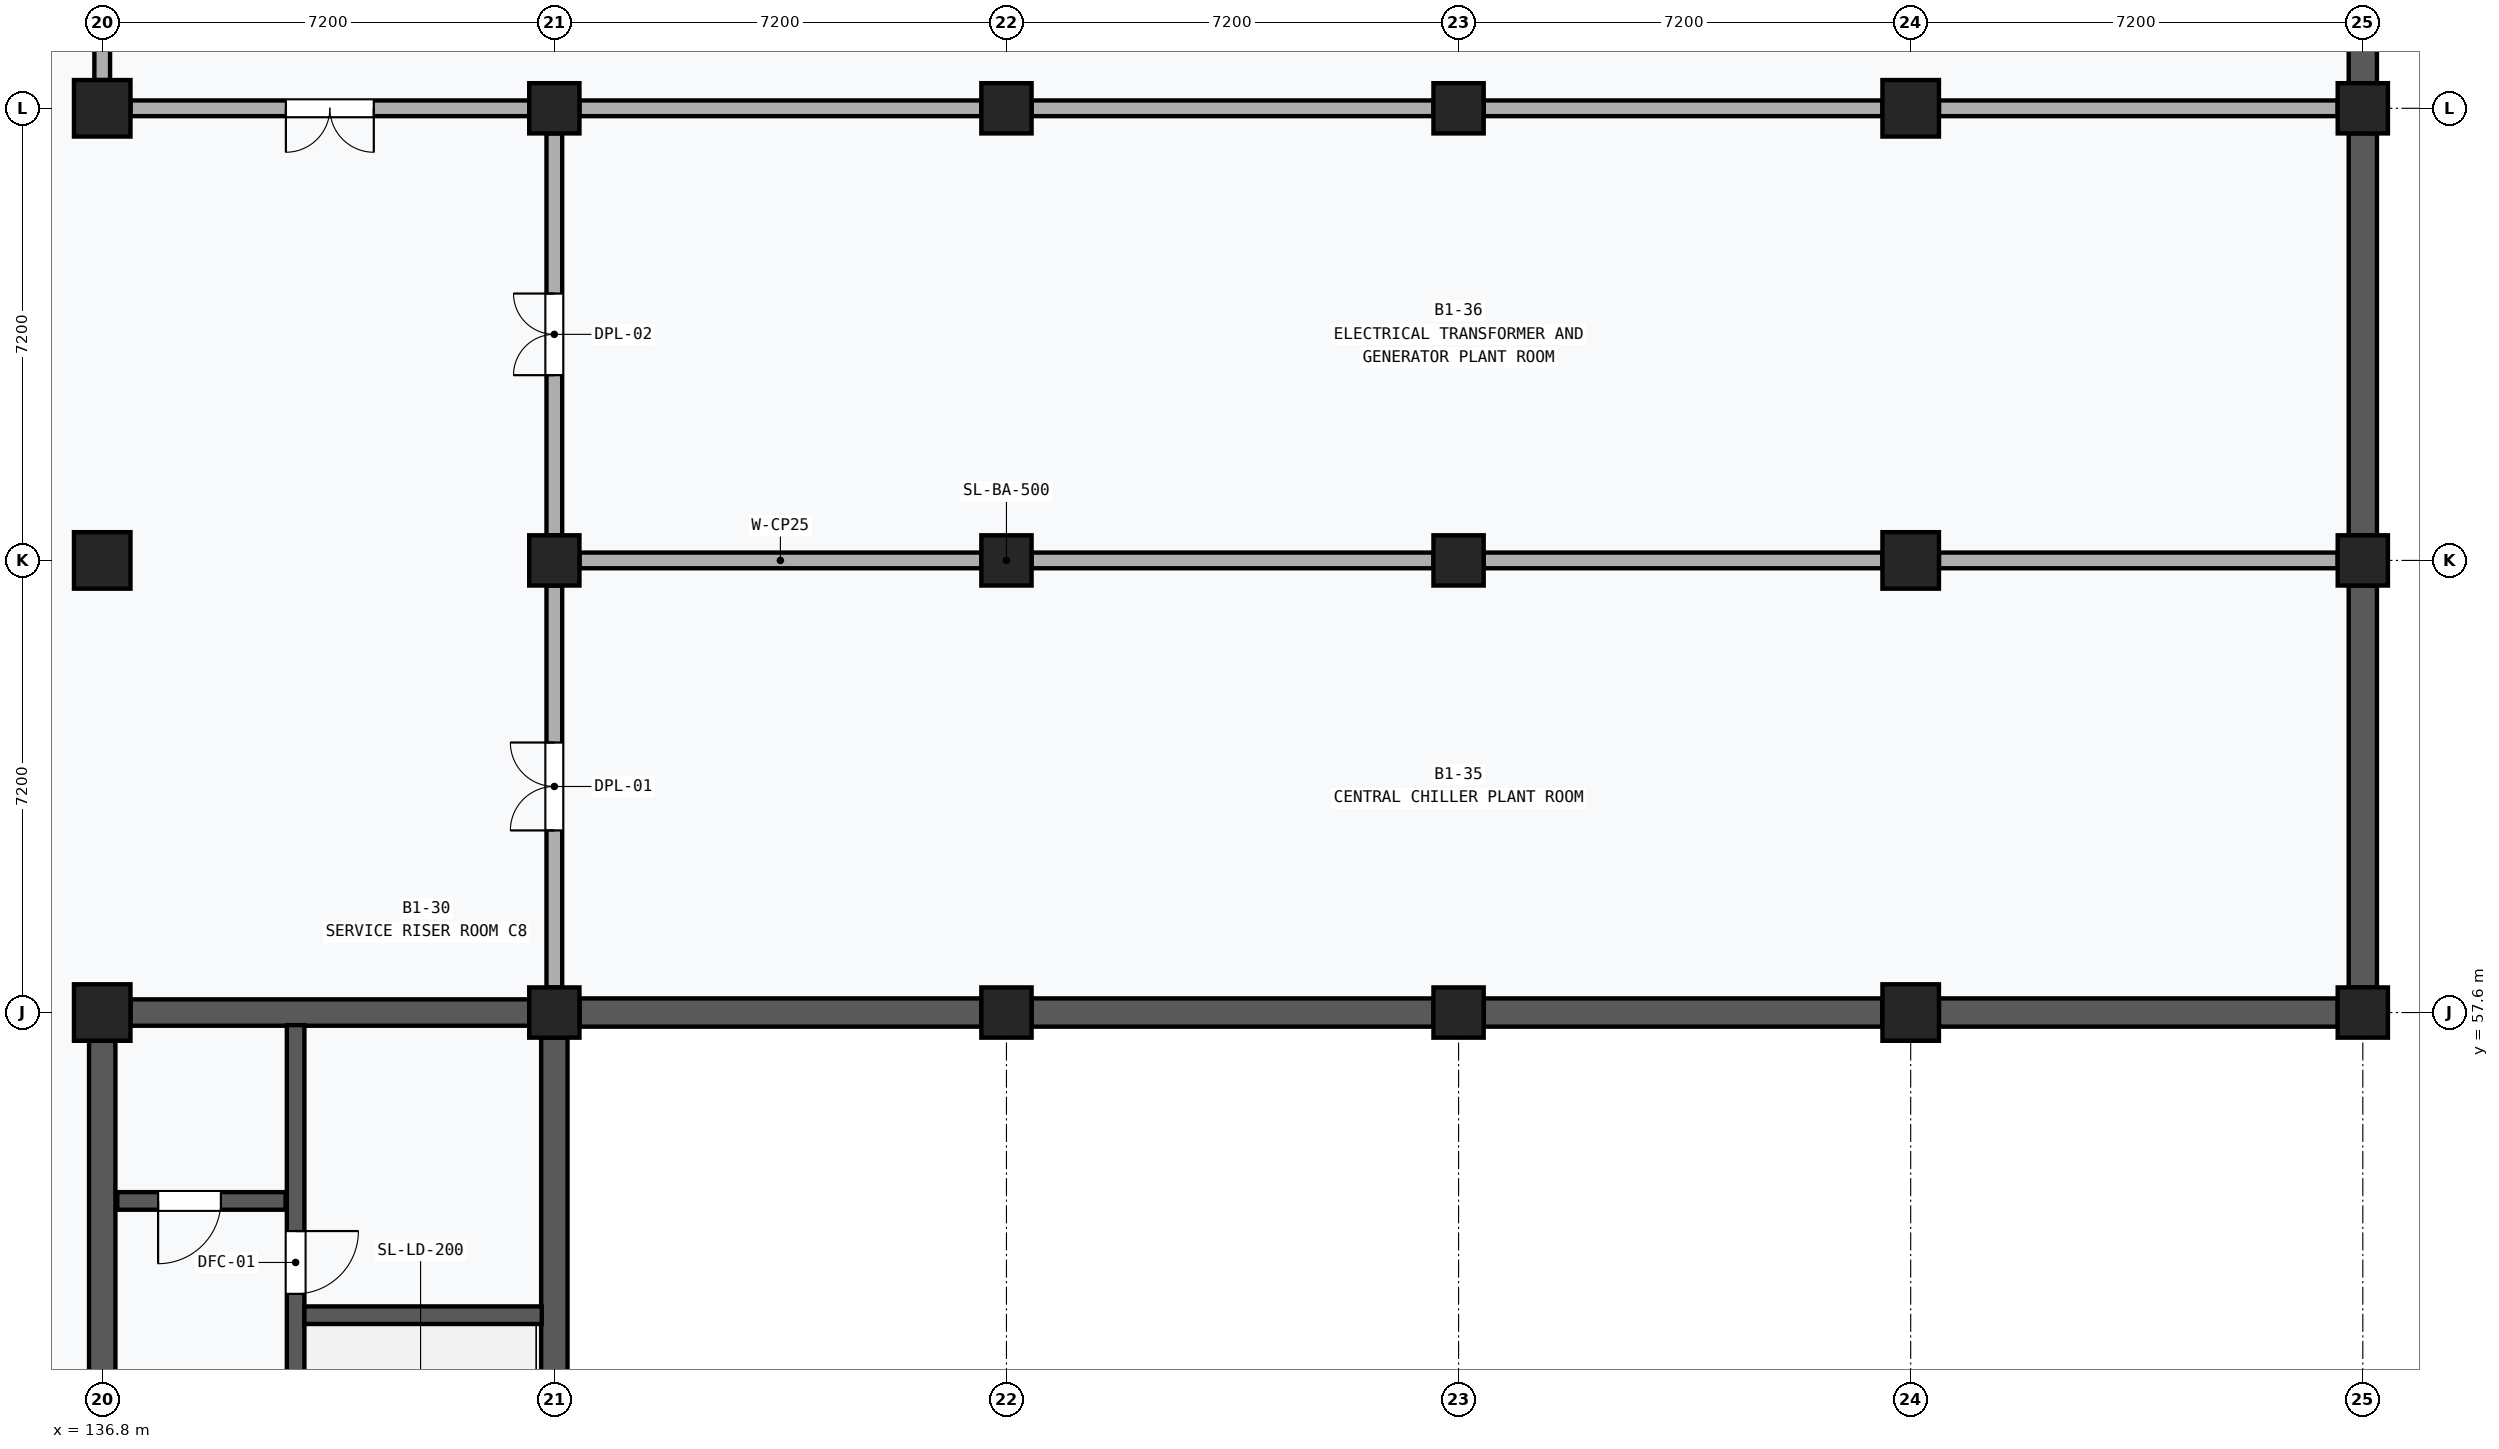
"""IFC4 building model, lengths in metres.
Left out: names, types, materials, properties, quantities, classifications, styles, units other than length and angle.
Written with IfcOpenShell. Run it as: python <this file> out.ifc"""

import sys

from ifc_helpers import new_model, si_unit, direction, frame, frame_2d, origin, origin_2d, place, context, subcontext, project, spatial, rectangle, extrude, element, fill, save


model = new_model("IFC4")
c1 = context("Model", 3, precision=1e-05, world=origin(), true_north=direction((0.0, 1.0)))
c2 = subcontext(c1, "Body", "Model", "MODEL_VIEW")
j1 = project(units=[si_unit("LENGTHUNIT", "METRE"), si_unit("PLANEANGLEUNIT", "RADIAN")], contexts=[c1])
p1 = place(None, origin())
s1 = spatial("IfcSite", under=j1, at=p1, CompositionType="ELEMENT")
p2 = place(p1, origin())
s2 = spatial("IfcBuilding", under=s1, at=p2, CompositionType="ELEMENT")
p3 = place(p2, frame((0.0, 0.0, -4.5)))
s3 = spatial("IfcBuildingStorey", under=s2, at=p3, CompositionType="ELEMENT", Elevation=-4.5)
for number, where, z_axis, x_axis in (
    (1, (136.8, 57.6, 0.0), (0.0, 0.0, 1.0), (1.0, 0.0, 0.0)),
    (2, (136.8, 64.8, 0.0), (0.0, 0.0, 1.0), (1.0, 0.0, 0.0)),
    (3, (136.8, 72.0, 0.0), (0.0, 0.0, 1.0), (1.0, 0.0, 0.0)),
):
    element("IfcColumn", number, at=place(p3, frame(where, z_axis=z_axis, x_axis=x_axis)), inside=s3, PredefinedType="COLUMN", context=c2, shape_type="SweptSolid", body=[
        extrude(rectangle(XDim=0.9, YDim=0.9, at=origin_2d()), origin(), (0.0, 0.0, 1.0), 4.5),
    ])
for number, where, z_axis, x_axis in (
    (4, (144.0, 57.6, 0.0), (0.0, 0.0, 1.0), (1.0, 0.0, 0.0)),
    (5, (144.0, 64.8, 0.0), (0.0, 0.0, 1.0), (1.0, 0.0, 0.0)),
    (6, (144.0, 72.0, 0.0), (0.0, 0.0, 1.0), (1.0, 0.0, 0.0)),
    (7, (151.2, 57.6, 0.0), (0.0, 0.0, 1.0), (1.0, 0.0, 0.0)),
    (8, (151.2, 64.8, 0.0), (0.0, 0.0, 1.0), (1.0, 0.0, 0.0)),
    (9, (151.2, 72.0, 0.0), (0.0, 0.0, 1.0), (1.0, 0.0, 0.0)),
    (10, (158.4, 57.6, 0.0), (0.0, 0.0, 1.0), (1.0, 0.0, 0.0)),
    (11, (158.4, 64.8, 0.0), (0.0, 0.0, 1.0), (1.0, 0.0, 0.0)),
    (12, (158.4, 72.0, 0.0), (0.0, 0.0, 1.0), (1.0, 0.0, 0.0)),
):
    element("IfcColumn", number, at=place(p3, frame(where, z_axis=z_axis, x_axis=x_axis)), inside=s3, PredefinedType="COLUMN", context=c2, shape_type="SweptSolid", body=[
        extrude(rectangle(XDim=0.8, YDim=0.8, at=origin_2d()), origin(), (0.0, 0.0, 1.0), 4.5),
    ])
for number, where, z_axis, x_axis in (
    (13, (165.6, 57.6, 0.0), (0.0, 0.0, 1.0), (1.0, 0.0, 0.0)),
    (14, (165.6, 64.8, 0.0), (0.0, 0.0, 1.0), (1.0, 0.0, 0.0)),
    (15, (165.6, 72.0, 0.0), (0.0, 0.0, 1.0), (1.0, 0.0, 0.0)),
):
    element("IfcColumn", number, at=place(p3, frame(where, z_axis=z_axis, x_axis=x_axis)), inside=s3, PredefinedType="COLUMN", context=c2, shape_type="SweptSolid", body=[
        extrude(rectangle(XDim=0.9, YDim=0.9, at=origin_2d()), origin(), (0.0, 0.0, 1.0), 4.5),
    ])
for number, where, z_axis, x_axis in (
    (16, (172.8, 57.6, 0.0), (0.0, 0.0, 1.0), (1.0, 0.0, 0.0)),
    (17, (172.8, 64.8, 0.0), (0.0, 0.0, 1.0), (1.0, 0.0, 0.0)),
    (18, (172.8, 72.0, 0.0), (0.0, 0.0, 1.0), (1.0, 0.0, 0.0)),
):
    element("IfcColumn", number, at=place(p3, frame(where, z_axis=z_axis, x_axis=x_axis)), inside=s3, PredefinedType="COLUMN", context=c2, shape_type="SweptSolid", body=[
        extrude(rectangle(XDim=0.8, YDim=0.8, at=origin_2d()), origin(), (0.0, 0.0, 1.0), 4.5),
    ])
p4 = place(p3, frame((144.4, 57.6, 0.0), z_axis=(0.0, 0.0, 1.0), x_axis=(1.0, 0.0, 0.0)))
e19 = element("IfcWall", 19, at=p4, inside=s3, PredefinedType="SOLIDWALL", context=c2, shape_type="SweptSolid", body=[
    extrude(rectangle(XDim=6.4, YDim=0.45, at=frame_2d((3.2, 0.0))), origin(), (0.0, 0.0, 1.0), 3.57),
])
p5 = place(p3, frame((151.6, 57.6, 0.0), z_axis=(0.0, 0.0, 1.0), x_axis=(1.0, 0.0, 0.0)))
e20 = element("IfcWall", 20, at=p5, inside=s3, PredefinedType="SOLIDWALL", context=c2, shape_type="SweptSolid", body=[
    extrude(rectangle(XDim=6.4, YDim=0.45, at=frame_2d((3.2, 0.0))), origin(), (0.0, 0.0, 1.0), 3.57),
])
for number, where, z_axis, x_axis in (
    (21, (158.8, 57.6, 0.0), (0.0, 0.0, 1.0), (1.0, 0.0, 0.0)),
    (22, (166.05, 57.6, 0.0), (0.0, 0.0, 1.0), (1.0, 0.0, 0.0)),
):
    element("IfcWall", number, at=place(p3, frame(where, z_axis=z_axis, x_axis=x_axis)), inside=s3, PredefinedType="SOLIDWALL", context=c2, shape_type="SweptSolid", body=[
        extrude(rectangle(XDim=6.35, YDim=0.45, at=frame_2d((3.175, 0.0))), origin(), (0.0, 0.0, 1.0), 3.57),
    ])
p6 = place(p3, frame((172.8, 58.0, 0.0), z_axis=(0.0, 0.0, 1.0), x_axis=(0.0, 1.0, 0.0)))
e23 = element("IfcWall", 23, at=p6, inside=s3, PredefinedType="SOLIDWALL", context=c2, shape_type="SweptSolid", body=[
    extrude(rectangle(XDim=6.4, YDim=0.45, at=frame_2d((3.2, 0.0))), origin(), (0.0, 0.0, 1.0), 3.57),
])
for number, where, z_axis, x_axis in (
    (24, (172.8, 65.2, 0.0), (0.0, 0.0, 1.0), (0.0, 1.0, 0.0)),
    (25, (172.8, 72.4, 0.0), (0.0, 0.0, 1.0), (0.0, 1.0, 0.0)),
):
    element("IfcWall", number, at=place(p3, frame(where, z_axis=z_axis, x_axis=x_axis)), inside=s3, PredefinedType="SOLIDWALL", context=c2, shape_type="SweptSolid", body=[
        extrude(rectangle(XDim=6.4, YDim=0.45, at=frame_2d((3.2, 0.0))), origin(), (0.0, 0.0, 1.0), 3.57),
    ])
p7 = place(p3, frame((136.8, 50.85, 0.0), z_axis=(0.0, 0.0, 1.0), x_axis=(0.0, 1.0, 0.0)))
e26 = element("IfcWall", 26, at=p7, inside=s3, PredefinedType="SHEAR", context=c2, shape_type="SweptSolid", body=[
    extrude(rectangle(XDim=6.3, YDim=0.42, at=frame_2d((3.15, 0.0))), origin(), (0.0, 0.0, 1.0), 3.3),
])
p8 = place(p3, frame((144.0, 50.8, 0.0), z_axis=(0.0, 0.0, 1.0), x_axis=(0.0, 1.0, 0.0)))
e27 = element("IfcWall", 27, at=p8, inside=s3, PredefinedType="SHEAR", context=c2, shape_type="SweptSolid", body=[
    extrude(rectangle(XDim=6.4, YDim=0.42, at=frame_2d((3.2, 0.0))), origin(), (0.0, 0.0, 1.0), 3.57),
])
p9 = place(p3, frame((137.25, 57.6, 0.0), z_axis=(0.0, 0.0, 1.0), x_axis=(1.0, 0.0, 0.0)))
e28 = element("IfcWall", 28, at=p9, inside=s3, PredefinedType="SHEAR", context=c2, shape_type="SweptSolid", body=[
    extrude(rectangle(XDim=6.35, YDim=0.42, at=frame_2d((3.175, 0.0))), origin(), (0.0, 0.0, 1.0), 3.3),
])
p10 = place(p3, frame((139.88, 43.4, 0.0), z_axis=(0.0, 0.0, 1.0), x_axis=(0.0, 1.0, 0.0)))
e29 = element("IfcWall", 29, at=p10, inside=s3, PredefinedType="SHEAR", context=c2, shape_type="SweptSolid", body=[
    extrude(rectangle(XDim=14.0, YDim=0.28, at=frame_2d((7.0, 0.0))), origin(), (0.0, 0.0, 1.0), 4.2),
])
p11 = place(p10, frame((0.35, 0.0, 0.0)))
e30 = element("IfcOpeningElement", 30, at=p11, cuts=e29, PredefinedType="OPENING", context=c2, shape_type="SweptSolid", body=[
    extrude(rectangle(XDim=1.75, YDim=2.15, at=frame_2d((0.875, 1.075))), frame((0.0, 0.152, 0.0), z_axis=(0.0, -1.0, 0.0), x_axis=(1.0, 0.0, 0.0)), (0.0, 0.0, 1.0), 0.304),
])
p12 = place(p10, frame((9.72, 0.0, 0.0)))
e31 = element("IfcOpeningElement", 31, at=p12, cuts=e29, PredefinedType="OPENING", context=c2, shape_type="SweptSolid", body=[
    extrude(rectangle(XDim=1.0, YDim=2.15, at=frame_2d((0.5, 1.075))), frame((0.0, 0.152, 0.0), z_axis=(0.0, -1.0, 0.0), x_axis=(1.0, 0.0, 0.0)), (0.0, 0.0, 1.0), 0.304),
])
p13 = place(p3, frame((140.02, 52.78, 0.0), z_axis=(0.0, 0.0, 1.0), x_axis=(1.0, 0.0, 0.0)))
e32 = element("IfcWall", 32, at=p13, inside=s3, PredefinedType="SHEAR", context=c2, shape_type="SweptSolid", body=[
    extrude(rectangle(XDim=3.78, YDim=0.28, at=frame_2d((1.89, 0.0))), origin(), (0.0, 0.0, 1.0), 4.2),
])
p14 = place(p3, frame((137.04, 54.6, 0.0), z_axis=(0.0, 0.0, 1.0), x_axis=(1.0, 0.0, 0.0)))
e33 = element("IfcWall", 33, at=p14, inside=s3, PredefinedType="SHEAR", context=c2, shape_type="SweptSolid", body=[
    extrude(rectangle(XDim=2.68, YDim=0.28, at=frame_2d((1.34, 0.0))), origin(), (0.0, 0.0, 1.0), 4.2),
])
p15 = place(p14, frame((0.65, 0.0, 0.0)))
e34 = element("IfcOpeningElement", 34, at=p15, cuts=e33, PredefinedType="OPENING", context=c2, shape_type="SweptSolid", body=[
    extrude(rectangle(XDim=1.0, YDim=2.15, at=frame_2d((0.5, 1.075))), frame((0.0, 0.152, 0.0), z_axis=(0.0, -1.0, 0.0), x_axis=(1.0, 0.0, 0.0)), (0.0, 0.0, 1.0), 0.304),
])
p16 = place(p3, frame((144.4, 64.8, 0.0), z_axis=(0.0, 0.0, 1.0), x_axis=(1.0, 0.0, 0.0)))
e35 = element("IfcWall", 35, at=p16, inside=s3, PredefinedType="PARTITIONING", context=c2, shape_type="SweptSolid", body=[
    extrude(rectangle(XDim=6.4, YDim=0.25, at=frame_2d((3.2, 0.0))), origin(), (0.0, 0.0, 1.0), 3.3),
])
p17 = place(p3, frame((144.0, 58.0, 0.0), z_axis=(0.0, 0.0, 1.0), x_axis=(0.0, 1.0, 0.0)))
e36 = element("IfcWall", 36, at=p17, inside=s3, PredefinedType="PARTITIONING", context=c2, shape_type="SweptSolid", body=[
    extrude(rectangle(XDim=6.4, YDim=0.25, at=frame_2d((3.2, 0.0))), origin(), (0.0, 0.0, 1.0), 3.3),
])
p18 = place(p17, frame((2.5, 0.0, 0.0)))
e37 = element("IfcOpeningElement", 37, at=p18, cuts=e36, PredefinedType="OPENING", context=c2, shape_type="SweptSolid", body=[
    extrude(rectangle(XDim=1.4, YDim=2.25, at=frame_2d((0.7, 1.125))), frame((0.0, 0.137, 0.0), z_axis=(0.0, -1.0, 0.0), x_axis=(1.0, 0.0, 0.0)), (0.0, 0.0, 1.0), 0.274),
])
p19 = place(p3, frame((151.6, 64.8, 0.0), z_axis=(0.0, 0.0, 1.0), x_axis=(1.0, 0.0, 0.0)))
e38 = element("IfcWall", 38, at=p19, inside=s3, PredefinedType="PARTITIONING", context=c2, shape_type="SweptSolid", body=[
    extrude(rectangle(XDim=6.4, YDim=0.25, at=frame_2d((3.2, 0.0))), origin(), (0.0, 0.0, 1.0), 3.3),
])
for number, where, z_axis, x_axis in (
    (39, (158.8, 64.8, 0.0), (0.0, 0.0, 1.0), (1.0, 0.0, 0.0)),
    (40, (166.05, 64.8, 0.0), (0.0, 0.0, 1.0), (1.0, 0.0, 0.0)),
):
    element("IfcWall", number, at=place(p3, frame(where, z_axis=z_axis, x_axis=x_axis)), inside=s3, PredefinedType="PARTITIONING", context=c2, shape_type="SweptSolid", body=[
        extrude(rectangle(XDim=6.35, YDim=0.25, at=frame_2d((3.175, 0.0))), origin(), (0.0, 0.0, 1.0), 3.3),
    ])
p20 = place(p3, frame((144.4, 72.0, 0.0), z_axis=(0.0, 0.0, 1.0), x_axis=(1.0, 0.0, 0.0)))
e41 = element("IfcWall", 41, at=p20, inside=s3, PredefinedType="PARTITIONING", context=c2, shape_type="SweptSolid", body=[
    extrude(rectangle(XDim=6.4, YDim=0.25, at=frame_2d((3.2, 0.0))), origin(), (0.0, 0.0, 1.0), 3.3),
])
p21 = place(p3, frame((144.0, 65.2, 0.0), z_axis=(0.0, 0.0, 1.0), x_axis=(0.0, 1.0, 0.0)))
e42 = element("IfcWall", 42, at=p21, inside=s3, PredefinedType="PARTITIONING", context=c2, shape_type="SweptSolid", body=[
    extrude(rectangle(XDim=6.4, YDim=0.25, at=frame_2d((3.2, 0.0))), origin(), (0.0, 0.0, 1.0), 3.3),
])
p22 = place(p21, frame((2.55, 0.0, 0.0)))
e43 = element("IfcOpeningElement", 43, at=p22, cuts=e42, PredefinedType="OPENING", context=c2, shape_type="SweptSolid", body=[
    extrude(rectangle(XDim=1.3, YDim=2.2, at=frame_2d((0.65, 1.1))), frame((0.0, 0.137, 0.0), z_axis=(0.0, -1.0, 0.0), x_axis=(1.0, 0.0, 0.0)), (0.0, 0.0, 1.0), 0.274),
])
p23 = place(p3, frame((151.6, 72.0, 0.0), z_axis=(0.0, 0.0, 1.0), x_axis=(1.0, 0.0, 0.0)))
e44 = element("IfcWall", 44, at=p23, inside=s3, PredefinedType="PARTITIONING", context=c2, shape_type="SweptSolid", body=[
    extrude(rectangle(XDim=6.4, YDim=0.25, at=frame_2d((3.2, 0.0))), origin(), (0.0, 0.0, 1.0), 3.3),
])
for number, where, z_axis, x_axis in (
    (45, (158.8, 72.0, 0.0), (0.0, 0.0, 1.0), (1.0, 0.0, 0.0)),
    (46, (166.05, 72.0, 0.0), (0.0, 0.0, 1.0), (1.0, 0.0, 0.0)),
):
    element("IfcWall", number, at=place(p3, frame(where, z_axis=z_axis, x_axis=x_axis)), inside=s3, PredefinedType="PARTITIONING", context=c2, shape_type="SweptSolid", body=[
        extrude(rectangle(XDim=6.35, YDim=0.25, at=frame_2d((3.175, 0.0))), origin(), (0.0, 0.0, 1.0), 3.3),
    ])
p24 = place(p3, frame((137.25, 72.0, 0.0), z_axis=(0.0, 0.0, 1.0), x_axis=(1.0, 0.0, 0.0)))
e47 = element("IfcWall", 47, at=p24, inside=s3, PredefinedType="PARTITIONING", context=c2, shape_type="SweptSolid", body=[
    extrude(rectangle(XDim=6.35, YDim=0.25, at=frame_2d((3.175, 0.0))), origin(), (0.0, 0.0, 1.0), 3.3),
])
p25 = place(p24, frame((2.475, 0.0, 0.0)))
e48 = element("IfcOpeningElement", 48, at=p25, cuts=e47, PredefinedType="OPENING", context=c2, shape_type="SweptSolid", body=[
    extrude(rectangle(XDim=1.4, YDim=2.25, at=frame_2d((0.7, 1.125))), frame((0.0, 0.137, 0.0), z_axis=(0.0, -1.0, 0.0), x_axis=(1.0, 0.0, 0.0)), (0.0, 0.0, 1.0), 0.274),
])
p26 = place(p3, frame((136.8, 72.45, 0.0), z_axis=(0.0, 0.0, 1.0), x_axis=(0.0, 1.0, 0.0)))
e49 = element("IfcWall", 49, at=p26, inside=s3, PredefinedType="PARTITIONING", context=c2, shape_type="SweptSolid", body=[
    extrude(rectangle(XDim=6.3, YDim=0.25, at=frame_2d((3.15, 0.0))), origin(), (0.0, 0.0, 1.0), 3.3),
])
p27 = place(p12, frame((1.0, 0.0, 0.0), z_axis=(0.0, 0.0, 1.0), x_axis=(-1.0, 0.0, 0.0)))
e50 = element("IfcDoor", 50, at=p27, inside=s3, OperationType="SINGLE_SWING_LEFT", PredefinedType="DOOR", context=c2, shape_type="SweptSolid", body=[
    extrude(rectangle(XDim=1.0, YDim=2.15, at=frame_2d((0.5, 1.075))), frame((0.0, 0.025, 0.0), z_axis=(0.0, -1.0, 0.0), x_axis=(1.0, 0.0, 0.0)), (0.0, 0.0, 1.0), 0.05),
])
fill(e31, e50)
p28 = place(p15, frame((1.0, 0.0, 0.0), z_axis=(0.0, 0.0, 1.0), x_axis=(-1.0, 0.0, 0.0)))
e51 = element("IfcDoor", 51, at=p28, inside=s3, OperationType="SINGLE_SWING_RIGHT", PredefinedType="DOOR", context=c2, shape_type="SweptSolid", body=[
    extrude(rectangle(XDim=1.0, YDim=2.15, at=frame_2d((0.5, 1.075))), frame((0.0, 0.025, 0.0), z_axis=(0.0, -1.0, 0.0), x_axis=(1.0, 0.0, 0.0)), (0.0, 0.0, 1.0), 0.05),
])
fill(e34, e51)
p29 = place(p18, origin())
e52 = element("IfcDoor", 52, at=p29, inside=s3, OperationType="DOUBLE_DOOR_SINGLE_SWING", PredefinedType="DOOR", context=c2, shape_type="SweptSolid", body=[
    extrude(rectangle(XDim=1.4, YDim=2.25, at=frame_2d((0.7, 1.125))), frame((0.0, 0.025, 0.0), z_axis=(0.0, -1.0, 0.0), x_axis=(1.0, 0.0, 0.0)), (0.0, 0.0, 1.0), 0.05),
])
fill(e37, e52)
p30 = place(p22, origin())
e53 = element("IfcDoor", 53, at=p30, inside=s3, OperationType="DOUBLE_DOOR_SINGLE_SWING", PredefinedType="DOOR", context=c2, shape_type="SweptSolid", body=[
    extrude(rectangle(XDim=1.3, YDim=2.2, at=frame_2d((0.65, 1.1))), frame((0.0, 0.025, 0.0), z_axis=(0.0, -1.0, 0.0), x_axis=(1.0, 0.0, 0.0)), (0.0, 0.0, 1.0), 0.05),
])
fill(e43, e53)
p31 = place(p25, frame((1.4, 0.0, 0.0), z_axis=(0.0, 0.0, 1.0), x_axis=(-1.0, 0.0, 0.0)))
e54 = element("IfcDoor", 54, at=p31, inside=s3, OperationType="DOUBLE_DOOR_SINGLE_SWING", PredefinedType="DOOR", context=c2, shape_type="SweptSolid", body=[
    extrude(rectangle(XDim=1.4, YDim=2.25, at=frame_2d((0.7, 1.125))), frame((0.0, 0.025, 0.0), z_axis=(0.0, -1.0, 0.0), x_axis=(1.0, 0.0, 0.0)), (0.0, 0.0, 1.0), 0.05),
])
fill(e48, e54)
save(model, sys.argv[1])
